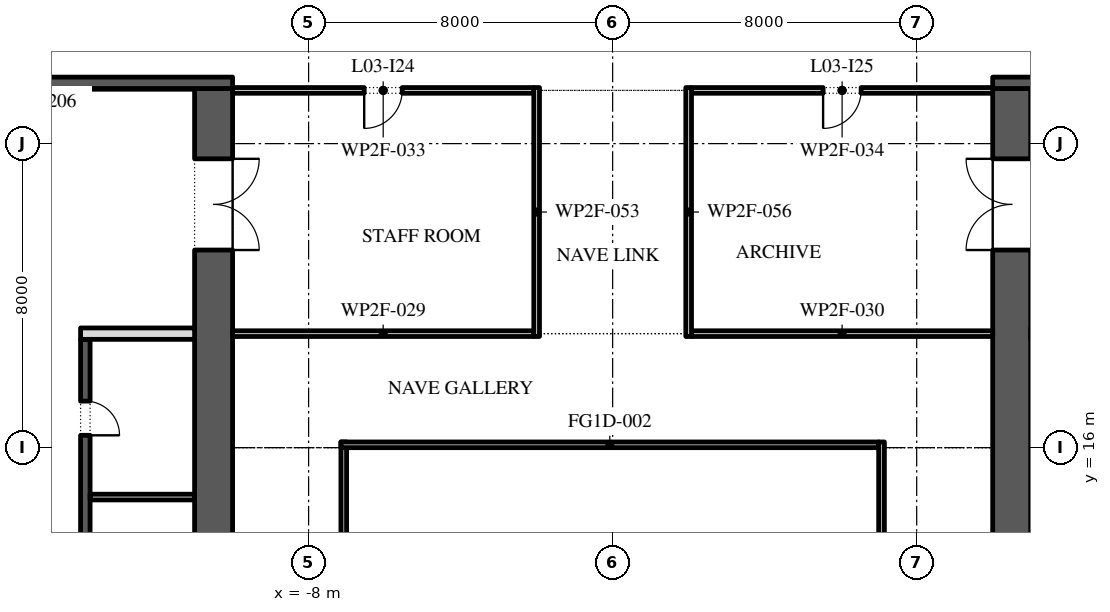
"""IFC4 building model, lengths in metres.
Left out: names, types, materials, properties, quantities, classifications, styles, units other than length and angle.
Written with IfcOpenShell. Run it as: python <this file> out.ifc"""

import sys

from ifc_helpers import new_model, si_unit, direction, frame, frame_2d, origin, place, context, subcontext, project, spatial, rectangle, extrude, element, fill, save


model = new_model("IFC4")
c1 = context("Model", 3, precision=1e-05, world=origin(), true_north=direction((0.0, 1.0)))
c2 = subcontext(c1, "Body", "Model", "MODEL_VIEW")
j1 = project(units=[si_unit("LENGTHUNIT", "METRE"), si_unit("PLANEANGLEUNIT", "RADIAN")], contexts=[c1])
p1 = place(None, origin())
s1 = spatial("IfcSite", under=j1, at=p1, CompositionType="ELEMENT")
p2 = place(p1, origin())
s2 = spatial("IfcBuilding", under=s1, at=p2, CompositionType="ELEMENT")
p3 = place(p2, frame((0.0, 0.0, 19.2)))
s3 = spatial("IfcBuildingStorey", under=s2, at=p3, CompositionType="ELEMENT", Elevation=19.2)
p4 = place(p3, frame((-7.075, -2.15, 0.0), z_axis=(0.0, 0.0, 1.0), x_axis=(0.0, 1.0, 0.0)))
e1 = element("IfcWall", 1, at=p4, inside=s3, PredefinedType="STANDARD", context=c2, shape_type="SweptSolid", body=[
    extrude(rectangle(XDim=18.3, YDim=0.15, at=frame_2d((9.15, 0.0))), origin(), (0.0, 0.0, 1.0), 4.5),
])
p5 = place(p3, frame((-7.15, 16.075, 0.0), z_axis=(0.0, 0.0, 1.0), x_axis=(1.0, 0.0, 0.0)))
e2 = element("IfcWall", 2, at=p5, inside=s3, PredefinedType="STANDARD", context=c2, shape_type="SweptSolid", body=[
    extrude(rectangle(XDim=14.15, YDim=0.15, at=frame_2d((7.075, 0.0))), origin(), (0.0, 0.0, 1.0), 3.52),
])
p6 = place(p3, frame((7.075, 16.15, 0.0), z_axis=(0.0, 0.0, 1.0), x_axis=(0.0, -1.0, 0.0)))
e3 = element("IfcWall", 3, at=p6, inside=s3, PredefinedType="STANDARD", context=c2, shape_type="SweptSolid", body=[
    extrude(rectangle(XDim=18.15, YDim=0.15, at=frame_2d((9.075, 0.0))), origin(), (0.0, 0.0, 1.0), 4.5),
])
p7 = place(p3, frame((-10.5, -2.45, 0.0), z_axis=(0.0, 0.0, 1.0), x_axis=(0.0, 1.0, 0.0)))
e4 = element("IfcWall", 4, at=p7, inside=s3, PredefinedType="SHEAR", context=c2, shape_type="SweptSolid", body=[
    extrude(rectangle(XDim=27.9, YDim=1.0, at=frame_2d((13.95, 0.0))), origin(), (0.0, 0.0, 1.0), 4.5),
])
p8 = place(p7, frame((23.65, 0.0, 0.0)))
e5 = element("IfcOpeningElement", 5, at=p8, cuts=e4, PredefinedType="OPENING", context=c2, shape_type="SweptSolid", body=[
    extrude(rectangle(XDim=2.4, YDim=2.1, at=frame_2d((1.2, 1.05))), frame((0.0, 0.51, 0.0), z_axis=(0.0, -1.0, 0.0), x_axis=(1.0, 0.0, 0.0)), (0.0, 0.0, 1.0), 1.02),
])
p9 = place(p7, frame((0.788, 0.0, 0.0)))
e6 = element("IfcOpeningElement", 6, at=p9, cuts=e4, PredefinedType="OPENING", context=c2, shape_type="SweptSolid", body=[
    extrude(rectangle(XDim=0.9, YDim=2.1, at=frame_2d((0.45, 1.05))), frame((0.0, 0.51, 0.0), z_axis=(0.0, -1.0, 0.0), x_axis=(1.0, 0.0, 0.0)), (0.0, 0.0, 1.0), 1.02),
])
p10 = place(p7, frame((4.012, 0.0, 0.0)))
e7 = element("IfcOpeningElement", 7, at=p10, cuts=e4, PredefinedType="OPENING", context=c2, shape_type="SweptSolid", body=[
    extrude(rectangle(XDim=0.9, YDim=2.1, at=frame_2d((0.45, 1.05))), frame((0.0, 0.51, 0.0), z_axis=(0.0, -1.0, 0.0), x_axis=(1.0, 0.0, 0.0)), (0.0, 0.0, 1.0), 1.02),
])
p11 = place(p3, frame((-22.0, 25.6, 0.0), z_axis=(0.0, 0.0, 1.0), x_axis=(1.0, 0.0, 0.0)))
e8 = element("IfcWall", 8, at=p11, inside=s3, PredefinedType="SHEAR", context=c2, shape_type="SweptSolid", body=[
    extrude(rectangle(XDim=12.0, YDim=0.3, at=frame_2d((6.0, 0.0))), origin(), (0.0, 0.0, 1.0), 4.5),
])
p12 = place(p3, frame((-13.875, -2.45, 0.0), z_axis=(0.0, 0.0, 1.0), x_axis=(0.0, 1.0, 0.0)))
e9 = element("IfcWall", 9, at=p12, inside=s3, PredefinedType="SHEAR", context=c2, shape_type="SweptSolid", body=[
    extrude(rectangle(XDim=21.3, YDim=0.25, at=frame_2d((10.65, 0.0))), origin(), (0.0, 0.0, 1.0), 4.5),
])
p13 = place(p12, frame((10.396, 0.0, 0.0)))
e10 = element("IfcOpeningElement", 10, at=p13, cuts=e9, PredefinedType="OPENING", context=c2, shape_type="SweptSolid", body=[
    extrude(rectangle(XDim=0.9, YDim=2.1, at=frame_2d((0.45, 1.05))), frame((0.0, 0.135, 0.0), z_axis=(0.0, -1.0, 0.0), x_axis=(1.0, 0.0, 0.0)), (0.0, 0.0, 1.0), 0.27),
])
p14 = place(p12, frame((14.6, 0.0, 0.0)))
e11 = element("IfcOpeningElement", 11, at=p14, cuts=e9, PredefinedType="OPENING", context=c2, shape_type="SweptSolid", body=[
    extrude(rectangle(XDim=0.9, YDim=2.1, at=frame_2d((0.45, 1.05))), frame((0.0, 0.135, 0.0), z_axis=(0.0, -1.0, 0.0), x_axis=(1.0, 0.0, 0.0)), (0.0, 0.0, 1.0), 0.27),
])
p15 = place(p12, frame((18.775, 0.0, 0.0)))
e12 = element("IfcOpeningElement", 12, at=p15, cuts=e9, PredefinedType="OPENING", context=c2, shape_type="SweptSolid", body=[
    extrude(rectangle(XDim=0.9, YDim=2.1, at=frame_2d((0.45, 1.05))), frame((0.0, 0.135, 0.0), z_axis=(0.0, -1.0, 0.0), x_axis=(1.0, 0.0, 0.0)), (0.0, 0.0, 1.0), 0.27),
])
p16 = place(p12, frame((6.971, 0.0, 0.0)))
e13 = element("IfcOpeningElement", 13, at=p16, cuts=e9, PredefinedType="OPENING", context=c2, shape_type="SweptSolid", body=[
    extrude(rectangle(XDim=1.1, YDim=2.1, at=frame_2d((0.55, 1.05))), frame((0.0, 0.135, 0.0), z_axis=(0.0, -1.0, 0.0), x_axis=(1.0, 0.0, 0.0)), (0.0, 0.0, 1.0), 0.27),
])
p17 = place(p3, frame((-14.0, 19.0, 0.0), z_axis=(0.0, 0.0, 1.0), x_axis=(1.0, 0.0, 0.0)))
e14 = element("IfcWall", 14, at=p17, inside=s3, PredefinedType="PARTITIONING", context=c2, shape_type="SweptSolid", body=[
    extrude(rectangle(XDim=3.0, YDim=0.3, at=frame_2d((1.5, 0.0))), origin(), (0.0, 0.0, 1.0), 4.5),
])
p18 = place(p3, frame((-13.75, 14.7, 0.0), z_axis=(0.0, 0.0, 1.0), x_axis=(1.0, 0.0, 0.0)))
e15 = element("IfcWall", 15, at=p18, inside=s3, PredefinedType="PARTITIONING", context=c2, shape_type="SweptSolid", body=[
    extrude(rectangle(XDim=2.75, YDim=0.15, at=frame_2d((1.375, 0.0))), origin(), (0.0, 0.0, 1.0), 4.5),
])
p19 = place(p3, frame((10.5, -2.45, 0.0), z_axis=(0.0, 0.0, 1.0), x_axis=(0.0, 1.0, 0.0)))
e16 = element("IfcWall", 16, at=p19, inside=s3, PredefinedType="SHEAR", context=c2, shape_type="SweptSolid", body=[
    extrude(rectangle(XDim=27.9, YDim=1.0, at=frame_2d((13.95, 0.0))), origin(), (0.0, 0.0, 1.0), 4.5),
])
p20 = place(p19, frame((23.65, 0.0, 0.0)))
e17 = element("IfcOpeningElement", 17, at=p20, cuts=e16, PredefinedType="OPENING", context=c2, shape_type="SweptSolid", body=[
    extrude(rectangle(XDim=2.4, YDim=2.1, at=frame_2d((1.2, 1.05))), frame((0.0, 0.51, 0.0), z_axis=(0.0, -1.0, 0.0), x_axis=(1.0, 0.0, 0.0)), (0.0, 0.0, 1.0), 1.02),
])
p21 = place(p19, frame((1.387, 0.0, 0.0)))
e18 = element("IfcOpeningElement", 18, at=p21, cuts=e16, PredefinedType="OPENING", context=c2, shape_type="SweptSolid", body=[
    extrude(rectangle(XDim=0.9, YDim=2.1, at=frame_2d((0.45, 1.05))), frame((0.0, 0.51, 0.0), z_axis=(0.0, -1.0, 0.0), x_axis=(1.0, 0.0, 0.0)), (0.0, 0.0, 1.0), 1.02),
])
p22 = place(p19, frame((4.613, 0.0, 0.0)))
e19 = element("IfcOpeningElement", 19, at=p22, cuts=e16, PredefinedType="OPENING", context=c2, shape_type="SweptSolid", body=[
    extrude(rectangle(XDim=0.9, YDim=2.1, at=frame_2d((0.45, 1.05))), frame((0.0, 0.51, 0.0), z_axis=(0.0, -1.0, 0.0), x_axis=(1.0, 0.0, 0.0)), (0.0, 0.0, 1.0), 1.02),
])
p23 = place(p3, frame((10.0, 25.6, 0.0), z_axis=(0.0, 0.0, 1.0), x_axis=(1.0, 0.0, 0.0)))
e20 = element("IfcWall", 20, at=p23, inside=s3, PredefinedType="SHEAR", context=c2, shape_type="SweptSolid", body=[
    extrude(rectangle(XDim=12.0, YDim=0.3, at=frame_2d((6.0, 0.0))), origin(), (0.0, 0.0, 1.0), 4.5),
])
for number, where, z_axis, x_axis in (
    (21, (-10.0, 19.0, 0.0), (0.0, 0.0, 1.0), (1.0, 0.0, 0.0)),
    (22, (2.075, 19.0, 0.0), (0.0, 0.0, 1.0), (1.0, 0.0, 0.0)),
):
    element("IfcWall", number, at=place(p3, frame(where, z_axis=z_axis, x_axis=x_axis)), inside=s3, PredefinedType="PARTITIONING", context=c2, shape_type="SweptSolid", body=[
        extrude(rectangle(XDim=7.925, YDim=0.15, at=frame_2d((3.962, 0.0))), origin(), (0.0, 0.0, 1.0), 4.5),
    ])
p24 = place(p3, frame((-10.0, 25.4, 0.0), z_axis=(0.0, 0.0, 1.0), x_axis=(1.0, 0.0, 0.0)))
e23 = element("IfcWall", 23, at=p24, inside=s3, PredefinedType="PARTITIONING", context=c2, shape_type="SweptSolid", body=[
    extrude(rectangle(XDim=7.925, YDim=0.15, at=frame_2d((3.962, 0.0))), origin(), (0.0, 0.0, 1.0), 4.5),
])
p25 = place(p24, frame((3.462, 0.0, 0.0)))
e24 = element("IfcOpeningElement", 24, at=p25, cuts=e23, PredefinedType="OPENING", context=c2, shape_type="SweptSolid", body=[
    extrude(rectangle(XDim=1.0, YDim=2.1, at=frame_2d((0.5, 1.05))), frame((0.0, 0.085, 0.0), z_axis=(0.0, -1.0, 0.0), x_axis=(1.0, 0.0, 0.0)), (0.0, 0.0, 1.0), 0.17),
])
p26 = place(p3, frame((2.075, 25.4, 0.0), z_axis=(0.0, 0.0, 1.0), x_axis=(1.0, 0.0, 0.0)))
e25 = element("IfcWall", 25, at=p26, inside=s3, PredefinedType="PARTITIONING", context=c2, shape_type="SweptSolid", body=[
    extrude(rectangle(XDim=7.925, YDim=0.15, at=frame_2d((3.962, 0.0))), origin(), (0.0, 0.0, 1.0), 4.5),
])
p27 = place(p26, frame((3.462, 0.0, 0.0)))
e26 = element("IfcOpeningElement", 26, at=p27, cuts=e25, PredefinedType="OPENING", context=c2, shape_type="SweptSolid", body=[
    extrude(rectangle(XDim=1.0, YDim=2.1, at=frame_2d((0.5, 1.05))), frame((0.0, 0.085, 0.0), z_axis=(0.0, -1.0, 0.0), x_axis=(1.0, 0.0, 0.0)), (0.0, 0.0, 1.0), 0.17),
])
for number, where, z_axis, x_axis in (
    (27, (-2.0, 18.925, 0.0), (0.0, 0.0, 1.0), (0.0, 1.0, 0.0)),
    (28, (2.0, 18.925, 0.0), (0.0, 0.0, 1.0), (0.0, 1.0, 0.0)),
):
    element("IfcWall", number, at=place(p3, frame(where, z_axis=z_axis, x_axis=x_axis)), inside=s3, PredefinedType="PARTITIONING", context=c2, shape_type="SweptSolid", body=[
        extrude(rectangle(XDim=6.55, YDim=0.15, at=frame_2d((3.275, 0.0))), origin(), (0.0, 0.0, 1.0), 4.5),
    ])
p28 = place(p15, frame((0.9, -0.2, 0.0), z_axis=(0.0, 0.0, 1.0), x_axis=(-1.0, 0.0, 0.0)))
e29 = element("IfcDoor", 29, at=p28, inside=s3, OperationType="SINGLE_SWING_LEFT", PredefinedType="DOOR", context=c2, shape_type="SweptSolid", body=[
    extrude(rectangle(XDim=0.9, YDim=2.1, at=frame_2d((0.45, 1.05))), frame((0.0, -0.075, 0.0), z_axis=(0.0, -1.0, 0.0), x_axis=(1.0, 0.0, 0.0)), (0.0, 0.0, 1.0), 0.05),
])
fill(e12, e29)
p29 = place(p8, frame((2.4, 0.0, 0.0), z_axis=(0.0, 0.0, 1.0), x_axis=(-1.0, 0.0, 0.0)))
e30 = element("IfcDoor", 30, at=p29, inside=s3, OperationType="DOUBLE_DOOR_SINGLE_SWING", PredefinedType="DOOR", context=c2, shape_type="SweptSolid", body=[
    extrude(rectangle(XDim=2.4, YDim=2.1, at=frame_2d((1.2, 1.05))), frame((0.0, 0.025, 0.0), z_axis=(0.0, -1.0, 0.0), x_axis=(1.0, 0.0, 0.0)), (0.0, 0.0, 1.0), 0.05),
])
fill(e5, e30)
p30 = place(p20, origin())
e31 = element("IfcDoor", 31, at=p30, inside=s3, OperationType="DOUBLE_DOOR_SINGLE_SWING", PredefinedType="DOOR", context=c2, shape_type="SweptSolid", body=[
    extrude(rectangle(XDim=2.4, YDim=2.1, at=frame_2d((1.2, 1.05))), frame((0.0, 0.025, 0.0), z_axis=(0.0, -1.0, 0.0), x_axis=(1.0, 0.0, 0.0)), (0.0, 0.0, 1.0), 0.05),
])
fill(e17, e31)
p31 = place(p25, frame((1.0, 0.0, 0.0), z_axis=(0.0, 0.0, 1.0), x_axis=(-1.0, 0.0, 0.0)))
e32 = element("IfcDoor", 32, at=p31, inside=s3, OperationType="SINGLE_SWING_LEFT", PredefinedType="DOOR", context=c2, shape_type="SweptSolid", body=[
    extrude(rectangle(XDim=1.0, YDim=2.1, at=frame_2d((0.5, 1.05))), frame((0.0, 0.025, 0.0), z_axis=(0.0, -1.0, 0.0), x_axis=(1.0, 0.0, 0.0)), (0.0, 0.0, 1.0), 0.05),
])
fill(e24, e32)
p32 = place(p27, frame((1.0, 0.0, 0.0), z_axis=(0.0, 0.0, 1.0), x_axis=(-1.0, 0.0, 0.0)))
e33 = element("IfcDoor", 33, at=p32, inside=s3, OperationType="SINGLE_SWING_LEFT", PredefinedType="DOOR", context=c2, shape_type="SweptSolid", body=[
    extrude(rectangle(XDim=1.0, YDim=2.1, at=frame_2d((0.5, 1.05))), frame((0.0, 0.025, 0.0), z_axis=(0.0, -1.0, 0.0), x_axis=(1.0, 0.0, 0.0)), (0.0, 0.0, 1.0), 0.05),
])
fill(e26, e33)
save(model, sys.argv[1])
